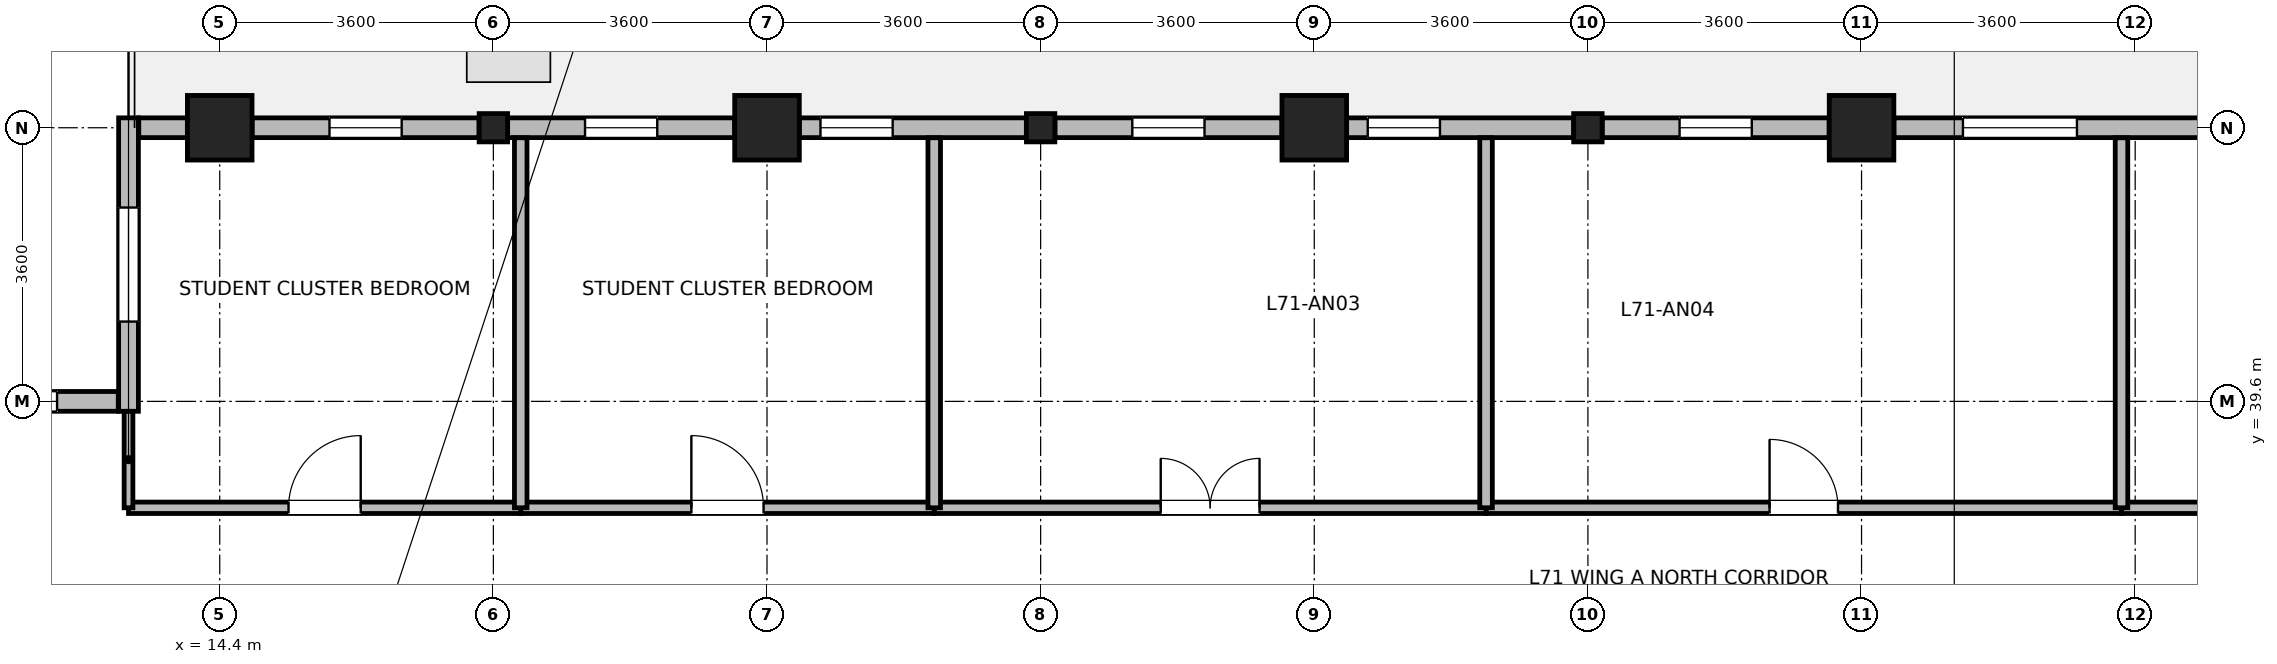
"""IFC4 building model, lengths in metres.
Left out: names, types, materials, properties, quantities, classifications, styles, units other than length and angle.
Written with IfcOpenShell. Run it as: python <this file> out.ifc"""

import sys

from ifc_helpers import new_model, si_unit, direction, frame, frame_2d, origin, origin_2d, place, context, subcontext, project, spatial, rectangle, i_section, extrude, source, transform, mapped, element, fill, save


model = new_model("IFC4")
c1 = context("Model", 3, precision=1e-05, world=origin(), true_north=direction((0.0, 1.0)))
c2 = subcontext(c1, "Body", "Model", "MODEL_VIEW")
j1 = project(units=[si_unit("LENGTHUNIT", "METRE"), si_unit("PLANEANGLEUNIT", "RADIAN")], contexts=[c1])
p1 = place(None, origin())
s1 = spatial("IfcSite", under=j1, at=p1, CompositionType="ELEMENT")
p2 = place(p1, origin())
s2 = spatial("IfcBuilding", under=s1, at=p2, CompositionType="ELEMENT")
p3 = place(p2, frame((0.0, 0.0, 275.8)))
s3 = spatial("IfcBuildingStorey", under=s2, at=p3, CompositionType="ELEMENT", Elevation=275.8)
m1 = source(origin(), c2, "Body", "SweptSolid", [
    extrude(rectangle(XDim=0.85, YDim=0.85, at=origin_2d()), origin(), (0.0, 0.0, 1.0), 3.7),
])
for number, where, z_axis, x_axis in (
    (1, (14.4, 43.2, 0.0), (0.0, 0.0, 1.0), (1.0, 0.0, 0.0)),
    (2, (21.6, 43.2, 0.0), (0.0, 0.0, 1.0), (1.0, 0.0, 0.0)),
    (3, (28.8, 43.2, 0.0), (0.0, 0.0, 1.0), (1.0, 0.0, 0.0)),
    (4, (36.0, 43.2, 0.0), (0.0, 0.0, 1.0), (1.0, 0.0, 0.0)),
):
    element("IfcColumn", number, at=place(p3, frame(where, z_axis=z_axis, x_axis=x_axis)), inside=s3, PredefinedType="COLUMN", context=c2, shape_type="MappedRepresentation", body=[
        mapped(m1, transform((0.0, 0.0, 0.0), x_axis=(1.0, 0.0, 0.0), y_axis=(0.0, 1.0, 0.0), z_axis=(0.0, 0.0, 1.0), scale=1.0)),
    ])
m2 = source(origin(), c2, "Body", "SweptSolid", [
    extrude(i_section(OverallWidth=0.374, OverallDepth=0.372, WebThickness=0.015, FlangeThickness=0.026, FilletRadius=0.015, at=origin_2d()), origin(), (0.0, 0.0, 1.0), 3.7),
])
for number, where, z_axis, x_axis in (
    (5, (18.0, 43.2, 0.0), (0.0, 0.0, 1.0), (1.0, 0.0, 0.0)),
    (6, (25.2, 43.2, 0.0), (0.0, 0.0, 1.0), (1.0, 0.0, 0.0)),
    (7, (32.4, 43.2, 0.0), (0.0, 0.0, 1.0), (1.0, 0.0, 0.0)),
):
    element("IfcColumn", number, at=place(p3, frame(where, z_axis=z_axis, x_axis=x_axis)), inside=s3, PredefinedType="COLUMN", context=c2, shape_type="MappedRepresentation", body=[
        mapped(m2, transform((0.0, 0.0, 0.0), x_axis=(1.0, 0.0, 0.0), y_axis=(0.0, 1.0, 0.0), z_axis=(0.0, 0.0, 1.0), scale=1.0)),
    ])
p4 = place(p3, frame((36.426, 43.2, 0.0), z_axis=(0.0, 0.0, 1.0), x_axis=(1.0, 0.0, 0.0)))
e8 = element("IfcWall", 8, at=p4, inside=s3, PredefinedType="STANDARD", context=c2, shape_type="SweptSolid", body=[
    extrude(rectangle(XDim=9.948, YDim=0.26, at=frame_2d((4.974, 0.0))), origin(), (0.0, 0.0, 1.0), 3.055),
])
p5 = place(p4, frame((4.224, 0.0, 0.0)))
e9 = element("IfcOpeningElement", 9, at=p5, cuts=e8, PredefinedType="OPENING", context=c2, shape_type="SweptSolid", body=[
    extrude(rectangle(XDim=1.5, YDim=2.15, at=frame_2d((0.75, 1.075))), frame((0.0, 0.14, 0.0), z_axis=(0.0, -1.0, 0.0), x_axis=(1.0, 0.0, 0.0)), (0.0, 0.0, 1.0), 0.28),
])
p6 = place(p4, frame((0.908, 0.0, 0.85)))
e10 = element("IfcOpeningElement", 10, at=p6, cuts=e8, PredefinedType="OPENING", context=c2, shape_type="SweptSolid", body=[
    extrude(rectangle(XDim=1.5, YDim=1.85, at=frame_2d((0.75, 0.925))), frame((0.0, 0.14, 0.0), z_axis=(0.0, -1.0, 0.0), x_axis=(1.0, 0.0, 0.0)), (0.0, 0.0, 1.0), 0.28),
])
p7 = place(p3, frame((32.588, 43.2, 0.0), z_axis=(0.0, 0.0, 1.0), x_axis=(1.0, 0.0, 0.0)))
e11 = element("IfcWall", 11, at=p7, inside=s3, PredefinedType="STANDARD", context=c2, shape_type="SweptSolid", body=[
    extrude(rectangle(XDim=2.986, YDim=0.26, at=frame_2d((1.493, 0.0))), origin(), (0.0, 0.0, 1.0), 3.055),
])
p8 = place(p7, frame((1.018, 0.0, 0.85)))
e12 = element("IfcOpeningElement", 12, at=p8, cuts=e11, PredefinedType="OPENING", context=c2, shape_type="SweptSolid", body=[
    extrude(rectangle(XDim=0.95, YDim=1.75, at=frame_2d((0.475, 0.875))), frame((0.0, 0.14, 0.0), z_axis=(0.0, -1.0, 0.0), x_axis=(1.0, 0.0, 0.0)), (0.0, 0.0, 1.0), 0.28),
])
p9 = place(p3, frame((29.226, 43.2, 0.0), z_axis=(0.0, 0.0, 1.0), x_axis=(1.0, 0.0, 0.0)))
e13 = element("IfcWall", 13, at=p9, inside=s3, PredefinedType="STANDARD", context=c2, shape_type="SweptSolid", body=[
    extrude(rectangle(XDim=2.986, YDim=0.26, at=frame_2d((1.493, 0.0))), origin(), (0.0, 0.0, 1.0), 3.055),
])
p10 = place(p9, frame((0.278, 0.0, 0.85)))
e14 = element("IfcOpeningElement", 14, at=p10, cuts=e13, PredefinedType="OPENING", context=c2, shape_type="SweptSolid", body=[
    extrude(rectangle(XDim=0.95, YDim=1.75, at=frame_2d((0.475, 0.875))), frame((0.0, 0.14, 0.0), z_axis=(0.0, -1.0, 0.0), x_axis=(1.0, 0.0, 0.0)), (0.0, 0.0, 1.0), 0.28),
])
p11 = place(p3, frame((25.388, 43.2, 0.0), z_axis=(0.0, 0.0, 1.0), x_axis=(1.0, 0.0, 0.0)))
e15 = element("IfcWall", 15, at=p11, inside=s3, PredefinedType="STANDARD", context=c2, shape_type="SweptSolid", body=[
    extrude(rectangle(XDim=2.986, YDim=0.26, at=frame_2d((1.493, 0.0))), origin(), (0.0, 0.0, 1.0), 3.055),
])
p12 = place(p11, frame((1.018, 0.0, 0.85)))
e16 = element("IfcOpeningElement", 16, at=p12, cuts=e15, PredefinedType="OPENING", context=c2, shape_type="SweptSolid", body=[
    extrude(rectangle(XDim=0.95, YDim=1.75, at=frame_2d((0.475, 0.875))), frame((0.0, 0.14, 0.0), z_axis=(0.0, -1.0, 0.0), x_axis=(1.0, 0.0, 0.0)), (0.0, 0.0, 1.0), 0.28),
])
p13 = place(p3, frame((22.026, 43.2, 0.0), z_axis=(0.0, 0.0, 1.0), x_axis=(1.0, 0.0, 0.0)))
e17 = element("IfcWall", 17, at=p13, inside=s3, PredefinedType="STANDARD", context=c2, shape_type="SweptSolid", body=[
    extrude(rectangle(XDim=2.986, YDim=0.26, at=frame_2d((1.493, 0.0))), origin(), (0.0, 0.0, 1.0), 3.055),
])
p14 = place(p13, frame((0.278, 0.0, 0.85)))
e18 = element("IfcOpeningElement", 18, at=p14, cuts=e17, PredefinedType="OPENING", context=c2, shape_type="SweptSolid", body=[
    extrude(rectangle(XDim=0.95, YDim=1.75, at=frame_2d((0.475, 0.875))), frame((0.0, 0.14, 0.0), z_axis=(0.0, -1.0, 0.0), x_axis=(1.0, 0.0, 0.0)), (0.0, 0.0, 1.0), 0.28),
])
p15 = place(p3, frame((18.188, 43.2, 0.0), z_axis=(0.0, 0.0, 1.0), x_axis=(1.0, 0.0, 0.0)))
e19 = element("IfcWall", 19, at=p15, inside=s3, PredefinedType="STANDARD", context=c2, shape_type="SweptSolid", body=[
    extrude(rectangle(XDim=2.986, YDim=0.26, at=frame_2d((1.493, 0.0))), origin(), (0.0, 0.0, 1.0), 3.055),
])
p16 = place(p15, frame((1.018, 0.0, 0.85)))
e20 = element("IfcOpeningElement", 20, at=p16, cuts=e19, PredefinedType="OPENING", context=c2, shape_type="SweptSolid", body=[
    extrude(rectangle(XDim=0.95, YDim=1.75, at=frame_2d((0.475, 0.875))), frame((0.0, 0.14, 0.0), z_axis=(0.0, -1.0, 0.0), x_axis=(1.0, 0.0, 0.0)), (0.0, 0.0, 1.0), 0.28),
])
p17 = place(p3, frame((14.826, 43.2, 0.0), z_axis=(0.0, 0.0, 1.0), x_axis=(1.0, 0.0, 0.0)))
e21 = element("IfcWall", 21, at=p17, inside=s3, PredefinedType="STANDARD", context=c2, shape_type="SweptSolid", body=[
    extrude(rectangle(XDim=2.986, YDim=0.26, at=frame_2d((1.493, 0.0))), origin(), (0.0, 0.0, 1.0), 3.055),
])
p18 = place(p17, frame((1.018, 0.0, 0.85)))
e22 = element("IfcOpeningElement", 22, at=p18, cuts=e21, PredefinedType="OPENING", context=c2, shape_type="SweptSolid", body=[
    extrude(rectangle(XDim=0.95, YDim=1.75, at=frame_2d((0.475, 0.875))), frame((0.0, 0.14, 0.0), z_axis=(0.0, -1.0, 0.0), x_axis=(1.0, 0.0, 0.0)), (0.0, 0.0, 1.0), 0.28),
])
p19 = place(p3, frame((13.335, 43.2, 0.0), z_axis=(0.0, 0.0, 1.0), x_axis=(1.0, 0.0, 0.0)))
e23 = element("IfcWall", 23, at=p19, inside=s3, PredefinedType="STANDARD", context=c2, shape_type="SweptSolid", body=[
    extrude(rectangle(XDim=0.639, YDim=0.26, at=frame_2d((0.32, 0.0))), origin(), (0.0, 0.0, 1.0), 3.455),
])
p20 = place(p3, frame((13.2, 39.47, 0.0), z_axis=(0.0, 0.0, 1.0), x_axis=(0.0, 1.0, 0.0)))
e24 = element("IfcWall", 24, at=p20, inside=s3, PredefinedType="STANDARD", context=c2, shape_type="SweptSolid", body=[
    extrude(rectangle(XDim=3.86, YDim=0.26, at=frame_2d((1.93, 0.0))), origin(), (0.0, 0.0, 1.0), 3.455),
])
p21 = place(p20, frame((1.18, 0.0, 0.85)))
e25 = element("IfcOpeningElement", 25, at=p21, cuts=e24, PredefinedType="OPENING", context=c2, shape_type="SweptSolid", body=[
    extrude(rectangle(XDim=1.5, YDim=1.85, at=frame_2d((0.75, 0.925))), frame((0.0, 0.14, 0.0), z_axis=(0.0, -1.0, 0.0), x_axis=(1.0, 0.0, 0.0)), (0.0, 0.0, 1.0), 0.28),
])
p22 = place(p3, frame((3.735, 39.6, 0.0), z_axis=(0.0, 0.0, 1.0), x_axis=(1.0, 0.0, 0.0)))
e26 = element("IfcWall", 26, at=p22, inside=s3, PredefinedType="STANDARD", context=c2, shape_type="SweptSolid", body=[
    extrude(rectangle(XDim=9.33, YDim=0.26, at=frame_2d((4.665, 0.0))), origin(), (0.0, 0.0, 1.0), 3.455),
])
p23 = place(p22, frame((0.805, 0.0, 0.85)))
e27 = element("IfcOpeningElement", 27, at=p23, cuts=e26, PredefinedType="OPENING", context=c2, shape_type="SweptSolid", body=[
    extrude(rectangle(XDim=1.5, YDim=1.85, at=frame_2d((0.75, 0.925))), frame((0.0, 0.14, 0.0), z_axis=(0.0, -1.0, 0.0), x_axis=(1.0, 0.0, 0.0)), (0.0, 0.0, 1.0), 0.28),
])
p24 = place(p22, frame((3.915, 0.0, 0.85)))
e28 = element("IfcOpeningElement", 28, at=p24, cuts=e26, PredefinedType="OPENING", context=c2, shape_type="SweptSolid", body=[
    extrude(rectangle(XDim=1.5, YDim=1.85, at=frame_2d((0.75, 0.925))), frame((0.0, 0.14, 0.0), z_axis=(0.0, -1.0, 0.0), x_axis=(1.0, 0.0, 0.0)), (0.0, 0.0, 1.0), 0.28),
])
p25 = place(p22, frame((7.025, 0.0, 0.85)))
e29 = element("IfcOpeningElement", 29, at=p25, cuts=e26, PredefinedType="OPENING", context=c2, shape_type="SweptSolid", body=[
    extrude(rectangle(XDim=1.5, YDim=1.85, at=frame_2d((0.75, 0.925))), frame((0.0, 0.14, 0.0), z_axis=(0.0, -1.0, 0.0), x_axis=(1.0, 0.0, 0.0)), (0.0, 0.0, 1.0), 0.28),
])
p26 = place(p3, frame((31.06, 38.2, 0.0), z_axis=(0.0, 0.0, 1.0), x_axis=(1.0, 0.0, 0.0)))
e30 = element("IfcWall", 30, at=p26, inside=s3, PredefinedType="PARTITIONING", context=c2, shape_type="SweptSolid", body=[
    extrude(rectangle(XDim=8.36, YDim=0.15, at=frame_2d((4.18, 0.0))), origin(), (0.0, 0.0, 1.0), 3.455),
])
p27 = place(p26, frame((3.73, 0.0, 0.0)))
e31 = element("IfcOpeningElement", 31, at=p27, cuts=e30, PredefinedType="OPENING", context=c2, shape_type="SweptSolid", body=[
    extrude(rectangle(XDim=0.9, YDim=2.08, at=frame_2d((0.45, 1.04))), frame((0.0, 0.085, 0.0), z_axis=(0.0, -1.0, 0.0), x_axis=(1.0, 0.0, 0.0)), (0.0, 0.0, 1.0), 0.17),
])
p28 = place(p3, frame((23.8, 38.2, 0.0), z_axis=(0.0, 0.0, 1.0), x_axis=(1.0, 0.0, 0.0)))
e32 = element("IfcWall", 32, at=p28, inside=s3, PredefinedType="PARTITIONING", context=c2, shape_type="SweptSolid", body=[
    extrude(rectangle(XDim=7.26, YDim=0.15, at=frame_2d((3.63, 0.0))), origin(), (0.0, 0.0, 1.0), 3.455),
])
p29 = place(p28, frame((2.98, 0.0, 0.0)))
e33 = element("IfcOpeningElement", 33, at=p29, cuts=e32, PredefinedType="OPENING", context=c2, shape_type="SweptSolid", body=[
    extrude(rectangle(XDim=1.3, YDim=2.12, at=frame_2d((0.65, 1.06))), frame((0.0, 0.085, 0.0), z_axis=(0.0, -1.0, 0.0), x_axis=(1.0, 0.0, 0.0)), (0.0, 0.0, 1.0), 0.17),
])
p30 = place(p3, frame((39.42, 38.2, 0.0), z_axis=(0.0, 0.0, 1.0), x_axis=(1.0, 0.0, 0.0)))
e34 = element("IfcWall", 34, at=p30, inside=s3, PredefinedType="PARTITIONING", context=c2, shape_type="SweptSolid", body=[
    extrude(rectangle(XDim=5.54, YDim=0.15, at=frame_2d((2.77, 0.0))), origin(), (0.0, 0.0, 1.0), 3.455),
])
p31 = place(p30, frame((2.12, 0.0, 0.0)))
e35 = element("IfcOpeningElement", 35, at=p31, cuts=e34, PredefinedType="OPENING", context=c2, shape_type="SweptSolid", body=[
    extrude(rectangle(XDim=1.3, YDim=2.12, at=frame_2d((0.65, 1.06))), frame((0.0, 0.085, 0.0), z_axis=(0.0, -1.0, 0.0), x_axis=(1.0, 0.0, 0.0)), (0.0, 0.0, 1.0), 0.17),
])
p32 = place(p3, frame((18.36, 38.2, 0.0), z_axis=(0.0, 0.0, 1.0), x_axis=(1.0, 0.0, 0.0)))
e36 = element("IfcWall", 36, at=p32, inside=s3, PredefinedType="PARTITIONING", context=c2, shape_type="SweptSolid", body=[
    extrude(rectangle(XDim=5.44, YDim=0.15, at=frame_2d((2.72, 0.0))), origin(), (0.0, 0.0, 1.0), 3.455),
])
p33 = place(p32, frame((2.245, 0.0, 0.0)))
e37 = element("IfcOpeningElement", 37, at=p33, cuts=e36, PredefinedType="OPENING", context=c2, shape_type="SweptSolid", body=[
    extrude(rectangle(XDim=0.95, YDim=2.1, at=frame_2d((0.475, 1.05))), frame((0.0, 0.085, 0.0), z_axis=(0.0, -1.0, 0.0), x_axis=(1.0, 0.0, 0.0)), (0.0, 0.0, 1.0), 0.17),
])
p34 = place(p3, frame((13.2, 38.2, 0.0), z_axis=(0.0, 0.0, 1.0), x_axis=(1.0, 0.0, 0.0)))
e38 = element("IfcWall", 38, at=p34, inside=s3, PredefinedType="PARTITIONING", context=c2, shape_type="SweptSolid", body=[
    extrude(rectangle(XDim=5.16, YDim=0.15, at=frame_2d((2.58, 0.0))), origin(), (0.0, 0.0, 1.0), 3.455),
])
p35 = place(p34, frame((2.105, 0.0, 0.0)))
e39 = element("IfcOpeningElement", 39, at=p35, cuts=e38, PredefinedType="OPENING", context=c2, shape_type="SweptSolid", body=[
    extrude(rectangle(XDim=0.95, YDim=2.1, at=frame_2d((0.475, 1.05))), frame((0.0, 0.085, 0.0), z_axis=(0.0, -1.0, 0.0), x_axis=(1.0, 0.0, 0.0)), (0.0, 0.0, 1.0), 0.17),
])
p36 = place(p3, frame((13.2, 38.2, 0.0), z_axis=(0.0, 0.0, 1.0), x_axis=(0.0, 1.0, 0.0)))
e40 = element("IfcWall", 40, at=p36, inside=s3, PredefinedType="PARTITIONING", context=c2, shape_type="SweptSolid", body=[
    extrude(rectangle(XDim=1.268, YDim=0.115, at=frame_2d((0.634, 0.0))), origin(), (0.0, 0.0, 1.0), 3.455),
])
for number, where, z_axis, x_axis in (
    (41, (18.36, 38.2, 0.0), (0.0, 0.0, 1.0), (0.0, 1.0, 0.0)),
    (42, (23.8, 38.2, 0.0), (0.0, 0.0, 1.0), (0.0, 1.0, 0.0)),
    (43, (31.06, 38.2, 0.0), (0.0, 0.0, 1.0), (0.0, 1.0, 0.0)),
    (44, (39.42, 38.2, 0.0), (0.0, 0.0, 1.0), (0.0, 1.0, 0.0)),
):
    element("IfcWall", number, at=place(p3, frame(where, z_axis=z_axis, x_axis=x_axis)), inside=s3, PredefinedType="PARTITIONING", context=c2, shape_type="SweptSolid", body=[
        extrude(rectangle(XDim=4.868, YDim=0.165, at=frame_2d((2.434, 0.0))), origin(), (0.0, 0.0, 1.0), 3.455),
    ])
p37 = place(p6, origin())
e45 = element("IfcWindow", 45, at=p37, inside=s3, PartitioningType="SINGLE_PANEL", PredefinedType="WINDOW", context=c2, shape_type="SweptSolid", body=[
    extrude(rectangle(XDim=1.5, YDim=1.85, at=frame_2d((0.75, 0.925))), frame((0.0, 0.03, 0.0), z_axis=(0.0, -1.0, 0.0), x_axis=(1.0, 0.0, 0.0)), (0.0, 0.0, 1.0), 0.06),
])
fill(e10, e45)
p38 = place(p8, origin())
e46 = element("IfcWindow", 46, at=p38, inside=s3, PartitioningType="SINGLE_PANEL", PredefinedType="WINDOW", context=c2, shape_type="SweptSolid", body=[
    extrude(rectangle(XDim=0.95, YDim=1.75, at=frame_2d((0.475, 0.875))), frame((0.0, 0.03, 0.0), z_axis=(0.0, -1.0, 0.0), x_axis=(1.0, 0.0, 0.0)), (0.0, 0.0, 1.0), 0.06),
])
fill(e12, e46)
p39 = place(p10, origin())
e47 = element("IfcWindow", 47, at=p39, inside=s3, PartitioningType="SINGLE_PANEL", PredefinedType="WINDOW", context=c2, shape_type="SweptSolid", body=[
    extrude(rectangle(XDim=0.95, YDim=1.75, at=frame_2d((0.475, 0.875))), frame((0.0, 0.03, 0.0), z_axis=(0.0, -1.0, 0.0), x_axis=(1.0, 0.0, 0.0)), (0.0, 0.0, 1.0), 0.06),
])
fill(e14, e47)
p40 = place(p12, origin())
e48 = element("IfcWindow", 48, at=p40, inside=s3, PartitioningType="SINGLE_PANEL", PredefinedType="WINDOW", context=c2, shape_type="SweptSolid", body=[
    extrude(rectangle(XDim=0.95, YDim=1.75, at=frame_2d((0.475, 0.875))), frame((0.0, 0.03, 0.0), z_axis=(0.0, -1.0, 0.0), x_axis=(1.0, 0.0, 0.0)), (0.0, 0.0, 1.0), 0.06),
])
fill(e16, e48)
p41 = place(p14, origin())
e49 = element("IfcWindow", 49, at=p41, inside=s3, PartitioningType="SINGLE_PANEL", PredefinedType="WINDOW", context=c2, shape_type="SweptSolid", body=[
    extrude(rectangle(XDim=0.95, YDim=1.75, at=frame_2d((0.475, 0.875))), frame((0.0, 0.03, 0.0), z_axis=(0.0, -1.0, 0.0), x_axis=(1.0, 0.0, 0.0)), (0.0, 0.0, 1.0), 0.06),
])
fill(e18, e49)
p42 = place(p16, origin())
e50 = element("IfcWindow", 50, at=p42, inside=s3, PartitioningType="SINGLE_PANEL", PredefinedType="WINDOW", context=c2, shape_type="SweptSolid", body=[
    extrude(rectangle(XDim=0.95, YDim=1.75, at=frame_2d((0.475, 0.875))), frame((0.0, 0.03, 0.0), z_axis=(0.0, -1.0, 0.0), x_axis=(1.0, 0.0, 0.0)), (0.0, 0.0, 1.0), 0.06),
])
fill(e20, e50)
p43 = place(p18, origin())
e51 = element("IfcWindow", 51, at=p43, inside=s3, PartitioningType="SINGLE_PANEL", PredefinedType="WINDOW", context=c2, shape_type="SweptSolid", body=[
    extrude(rectangle(XDim=0.95, YDim=1.75, at=frame_2d((0.475, 0.875))), frame((0.0, 0.03, 0.0), z_axis=(0.0, -1.0, 0.0), x_axis=(1.0, 0.0, 0.0)), (0.0, 0.0, 1.0), 0.06),
])
fill(e22, e51)
p44 = place(p21, origin())
e52 = element("IfcWindow", 52, at=p44, inside=s3, PartitioningType="SINGLE_PANEL", PredefinedType="WINDOW", context=c2, shape_type="SweptSolid", body=[
    extrude(rectangle(XDim=1.5, YDim=1.85, at=frame_2d((0.75, 0.925))), frame((0.0, 0.03, 0.0), z_axis=(0.0, -1.0, 0.0), x_axis=(1.0, 0.0, 0.0)), (0.0, 0.0, 1.0), 0.06),
])
fill(e25, e52)
p45 = place(p25, origin())
e53 = element("IfcWindow", 53, at=p45, inside=s3, PartitioningType="SINGLE_PANEL", PredefinedType="WINDOW", context=c2, shape_type="SweptSolid", body=[
    extrude(rectangle(XDim=1.5, YDim=1.85, at=frame_2d((0.75, 0.925))), frame((0.0, 0.03, 0.0), z_axis=(0.0, -1.0, 0.0), x_axis=(1.0, 0.0, 0.0)), (0.0, 0.0, 1.0), 0.06),
])
fill(e29, e53)
p46 = place(p27, origin())
e54 = element("IfcDoor", 54, at=p46, inside=s3, OperationType="SINGLE_SWING_LEFT", PredefinedType="DOOR", context=c2, shape_type="SweptSolid", body=[
    extrude(rectangle(XDim=0.9, YDim=2.08, at=frame_2d((0.45, 1.04))), frame((0.0, 0.025, 0.0), z_axis=(0.0, -1.0, 0.0), x_axis=(1.0, 0.0, 0.0)), (0.0, 0.0, 1.0), 0.05),
])
fill(e31, e54)
p47 = place(p29, origin())
e55 = element("IfcDoor", 55, at=p47, inside=s3, OperationType="DOUBLE_DOOR_SINGLE_SWING", PredefinedType="DOOR", context=c2, shape_type="SweptSolid", body=[
    extrude(rectangle(XDim=1.3, YDim=2.12, at=frame_2d((0.65, 1.06))), frame((0.0, 0.025, 0.0), z_axis=(0.0, -1.0, 0.0), x_axis=(1.0, 0.0, 0.0)), (0.0, 0.0, 1.0), 0.05),
])
fill(e33, e55)
p48 = place(p33, origin())
e56 = element("IfcDoor", 56, at=p48, inside=s3, OperationType="SINGLE_SWING_LEFT", PredefinedType="DOOR", context=c2, shape_type="SweptSolid", body=[
    extrude(rectangle(XDim=0.95, YDim=2.1, at=frame_2d((0.475, 1.05))), frame((0.0, 0.025, 0.0), z_axis=(0.0, -1.0, 0.0), x_axis=(1.0, 0.0, 0.0)), (0.0, 0.0, 1.0), 0.05),
])
fill(e37, e56)
p49 = place(p35, origin())
e57 = element("IfcDoor", 57, at=p49, inside=s3, OperationType="SINGLE_SWING_RIGHT", PredefinedType="DOOR", context=c2, shape_type="SweptSolid", body=[
    extrude(rectangle(XDim=0.95, YDim=2.1, at=frame_2d((0.475, 1.05))), frame((0.0, 0.025, 0.0), z_axis=(0.0, -1.0, 0.0), x_axis=(1.0, 0.0, 0.0)), (0.0, 0.0, 1.0), 0.05),
])
fill(e39, e57)
save(model, sys.argv[1])
